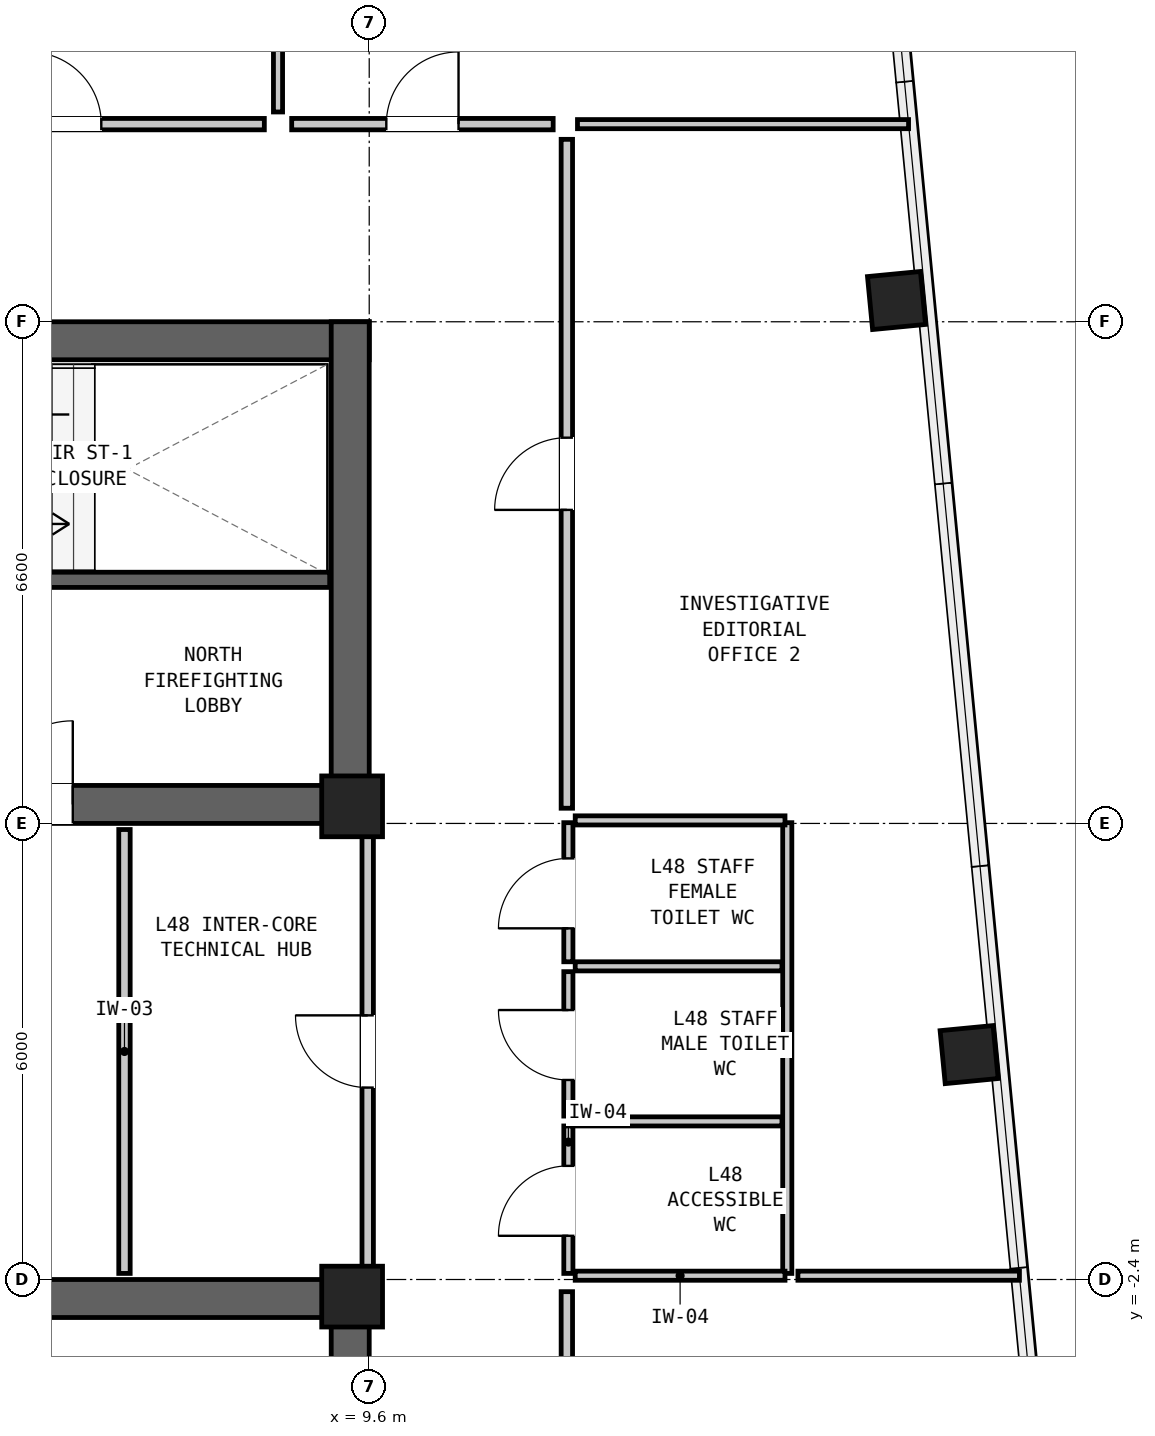
"""IFC4 building model, lengths in metres.
Left out: names, types, materials, properties, quantities, classifications, styles, units other than length and angle.
Written with IfcOpenShell. Run it as: python <this file> out.ifc"""

import sys

from ifc_helpers import new_model, si_unit, direction, frame, frame_2d, origin, origin_2d, place, context, subcontext, project, spatial, rectangle, hollow_rectangle, extrude, element, fill, save


model = new_model("IFC4")
c1 = context("Model", 3, precision=1e-05, world=origin(), true_north=direction((0.0, 1.0)))
c2 = subcontext(c1, "Body", "Model", "MODEL_VIEW")
j1 = project(units=[si_unit("LENGTHUNIT", "METRE"), si_unit("PLANEANGLEUNIT", "RADIAN")], contexts=[c1])
p1 = place(None, origin())
s1 = spatial("IfcSite", under=j1, at=p1, CompositionType="ELEMENT")
p2 = place(p1, origin())
s2 = spatial("IfcBuilding", under=s1, at=p2, CompositionType="ELEMENT")
p3 = place(p2, frame((0.0, 0.0, 165.3)))
s3 = spatial("IfcBuildingStorey", under=s2, at=p3, CompositionType="ELEMENT", Elevation=165.3)
p4 = place(p3, frame((-9.6, 9.95, 0.0), z_axis=(0.0, 0.0, 1.0), x_axis=(1.0, 0.0, 0.0)))
e1 = element("IfcWall", 1, at=p4, inside=s3, PredefinedType="SHEAR", context=c2, shape_type="SweptSolid", body=[
    extrude(rectangle(XDim=19.2, YDim=0.5, at=frame_2d((9.6, 0.0))), origin(), (0.0, 0.0, 1.0), 3.05),
])
p5 = place(p3, frame((-9.6, 3.85, 0.0), z_axis=(0.0, 0.0, 1.0), x_axis=(1.0, 0.0, 0.0)))
e2 = element("IfcWall", 2, at=p5, inside=s3, PredefinedType="SHEAR", context=c2, shape_type="SweptSolid", body=[
    extrude(rectangle(XDim=19.2, YDim=0.5, at=frame_2d((9.6, 0.0))), origin(), (0.0, 0.0, 1.0), 3.05),
])
p6 = place(p5, frame((14.2, 0.0, 0.0)))
e3 = element("IfcOpeningElement", 3, at=p6, cuts=e2, PredefinedType="OPENING", context=c2, shape_type="SweptSolid", body=[
    extrude(rectangle(XDim=1.1, YDim=2.08, at=frame_2d((0.55, 1.04))), frame((0.0, 0.262, 0.0), z_axis=(0.0, -1.0, 0.0), x_axis=(1.0, 0.0, 0.0)), (0.0, 0.0, 1.0), 0.524),
])
p7 = place(p5, frame((8.2, 0.0, 0.0)))
e4 = element("IfcOpeningElement", 4, at=p7, cuts=e2, PredefinedType="OPENING", context=c2, shape_type="SweptSolid", body=[
    extrude(rectangle(XDim=1.15, YDim=2.1, at=frame_2d((0.575, 1.05))), frame((0.0, 0.262, 0.0), z_axis=(0.0, -1.0, 0.0), x_axis=(1.0, 0.0, 0.0)), (0.0, 0.0, 1.0), 0.524),
])
p8 = place(p5, frame((2.5, 0.0, 0.0)))
e5 = element("IfcOpeningElement", 5, at=p8, cuts=e2, PredefinedType="OPENING", context=c2, shape_type="SweptSolid", body=[
    extrude(rectangle(XDim=1.2, YDim=2.1, at=frame_2d((0.6, 1.05))), frame((0.0, 0.262, 0.0), z_axis=(0.0, -1.0, 0.0), x_axis=(1.0, 0.0, 0.0)), (0.0, 0.0, 1.0), 0.524),
])
p9 = place(p3, frame((9.35, 3.6, 0.0), z_axis=(0.0, 0.0, 1.0), x_axis=(0.0, 1.0, 0.0)))
e6 = element("IfcWall", 6, at=p9, inside=s3, PredefinedType="SHEAR", context=c2, shape_type="SweptSolid", body=[
    extrude(rectangle(XDim=6.6, YDim=0.5, at=frame_2d((3.3, 0.0))), origin(), (0.0, 0.0, 1.0), 3.05),
])
p10 = place(p3, frame((-9.6, -2.65, 0.0), z_axis=(0.0, 0.0, 1.0), x_axis=(1.0, 0.0, 0.0)))
e7 = element("IfcWall", 7, at=p10, inside=s3, PredefinedType="SHEAR", context=c2, shape_type="SweptSolid", body=[
    extrude(rectangle(XDim=19.2, YDim=0.5, at=frame_2d((9.6, 0.0))), origin(), (0.0, 0.0, 1.0), 3.05),
])
p11 = place(p10, frame((3.8, 0.0, 0.0)))
e8 = element("IfcOpeningElement", 8, at=p11, cuts=e7, PredefinedType="OPENING", context=c2, shape_type="SweptSolid", body=[
    extrude(rectangle(XDim=1.1, YDim=2.08, at=frame_2d((0.55, 1.04))), frame((0.0, 0.262, 0.0), z_axis=(0.0, -1.0, 0.0), x_axis=(1.0, 0.0, 0.0)), (0.0, 0.0, 1.0), 0.524),
])
p12 = place(p10, frame((13.0, 0.0, 0.0)))
e9 = element("IfcOpeningElement", 9, at=p12, cuts=e7, PredefinedType="OPENING", context=c2, shape_type="SweptSolid", body=[
    extrude(rectangle(XDim=1.6, YDim=2.12, at=frame_2d((0.8, 1.06))), frame((0.0, 0.262, 0.0), z_axis=(0.0, -1.0, 0.0), x_axis=(1.0, 0.0, 0.0)), (0.0, 0.0, 1.0), 0.524),
])
p13 = place(p3, frame((9.35, -9.0, 0.0), z_axis=(0.0, 0.0, 1.0), x_axis=(0.0, 1.0, 0.0)))
e10 = element("IfcWall", 10, at=p13, inside=s3, PredefinedType="SHEAR", context=c2, shape_type="SweptSolid", body=[
    extrude(rectangle(XDim=6.6, YDim=0.5, at=frame_2d((3.3, 0.0))), origin(), (0.0, 0.0, 1.0), 3.05),
])
for number, where, z_axis, x_axis in (
    (11, (17.493, 0.559, 0.0), (0.0, 0.0, 1.0), (-0.096, 0.995, 0.0)),
    (12, (16.537, 10.479, 0.0), (0.0, 0.0, 1.0), (-0.096, 0.995, 0.0)),
):
    element("IfcColumn", number, at=place(p3, frame(where, z_axis=z_axis, x_axis=x_axis)), inside=s3, PredefinedType="COLUMN", context=c2, shape_type="SweptSolid", body=[
        extrude(hollow_rectangle(XDim=0.7, YDim=0.7, WallThickness=0.045, at=origin_2d()), origin(), (0.0, 0.0, 1.0), 3.05),
    ])
for number, where, z_axis, x_axis in (
    (13, (9.375, 3.825, 0.0), (0.0, 0.0, 1.0), (1.0, 0.0, 0.0)),
    (14, (9.375, -2.625, 0.0), (0.0, 0.0, 1.0), (1.0, 0.0, 0.0)),
):
    element("IfcColumn", number, at=place(p3, frame(where, z_axis=z_axis, x_axis=x_axis)), inside=s3, PredefinedType="COLUMN", context=c2, shape_type="SweptSolid", body=[
        extrude(rectangle(XDim=0.8, YDim=0.8, at=origin_2d()), origin(), (0.0, 0.0, 1.0), 3.05),
    ])
p14 = place(p3, frame((2.36, 6.805, 0.0), z_axis=(0.0, 0.0, 1.0), x_axis=(1.0, 0.0, 0.0)))
e15 = element("IfcWall", 15, at=p14, inside=s3, PredefinedType="SHEAR", context=c2, shape_type="SweptSolid", body=[
    extrude(rectangle(XDim=6.72, YDim=0.2, at=frame_2d((3.36, 0.0))), origin(), (0.0, 0.0, 1.0), 2.83),
])
p15 = place(p14, frame((0.3, 0.0, 0.0)))
e16 = element("IfcOpeningElement", 16, at=p15, cuts=e15, PredefinedType="OPENING", context=c2, shape_type="SweptSolid", body=[
    extrude(rectangle(XDim=1.05, YDim=2.08, at=frame_2d((0.525, 1.04))), frame((0.0, 0.112, 0.0), z_axis=(0.0, -1.0, 0.0), x_axis=(1.0, 0.0, 0.0)), (0.0, 0.0, 1.0), 0.224),
])
p16 = place(p3, frame((6.38, -2.32, 0.0), z_axis=(0.0, 0.0, 1.0), x_axis=(0.0, 1.0, 0.0)))
e17 = element("IfcWall", 17, at=p16, inside=s3, PredefinedType="PARTITIONING", context=c2, shape_type="SweptSolid", body=[
    extrude(rectangle(XDim=5.84, YDim=0.15, at=frame_2d((2.92, 0.0))), origin(), (0.0, 0.0, 1.0), 2.198),
])
p17 = place(p3, frame((9.58, -2.32, 0.0), z_axis=(0.0, 0.0, 1.0), x_axis=(0.0, 1.0, 0.0)))
e18 = element("IfcWall", 18, at=p17, inside=s3, PredefinedType="PARTITIONING", context=c2, shape_type="SweptSolid", body=[
    extrude(rectangle(XDim=5.84, YDim=0.15, at=frame_2d((2.92, 0.0))), origin(), (0.0, 0.0, 1.0), 2.198),
])
p18 = place(p17, frame((2.445, 0.0, 0.0)))
e19 = element("IfcOpeningElement", 19, at=p18, cuts=e18, PredefinedType="OPENING", context=c2, shape_type="SweptSolid", body=[
    extrude(rectangle(XDim=0.95, YDim=2.1, at=frame_2d((0.475, 1.05))), frame((0.0, 0.087, 0.0), z_axis=(0.0, -1.0, 0.0), x_axis=(1.0, 0.0, 0.0)), (0.0, 0.0, 1.0), 0.174),
])
p19 = place(p3, frame((12.22, -2.32, 0.0), z_axis=(0.0, 0.0, 1.0), x_axis=(0.0, 1.0, 0.0)))
e20 = element("IfcWall", 20, at=p19, inside=s3, PredefinedType="PARTITIONING", context=c2, shape_type="SweptSolid", body=[
    extrude(rectangle(XDim=1.94, YDim=0.12, at=frame_2d((0.97, 0.0))), origin(), (0.0, 0.0, 1.0), 2.83),
])
p20 = place(p19, frame((0.495, 0.0, 0.0)))
e21 = element("IfcOpeningElement", 21, at=p20, cuts=e20, PredefinedType="OPENING", context=c2, shape_type="SweptSolid", body=[
    extrude(rectangle(XDim=0.92, YDim=2.1, at=frame_2d((0.46, 1.05))), frame((0.0, 0.072, 0.0), z_axis=(0.0, -1.0, 0.0), x_axis=(1.0, 0.0, 0.0)), (0.0, 0.0, 1.0), 0.144),
])
p21 = place(p3, frame((12.22, -0.25, 0.0), z_axis=(0.0, 0.0, 1.0), x_axis=(0.0, 1.0, 0.0)))
e22 = element("IfcWall", 22, at=p21, inside=s3, PredefinedType="PARTITIONING", context=c2, shape_type="SweptSolid", body=[
    extrude(rectangle(XDim=1.9, YDim=0.12, at=frame_2d((0.95, 0.0))), origin(), (0.0, 0.0, 1.0), 2.83),
])
p22 = place(p21, frame((0.475, 0.0, 0.0)))
e23 = element("IfcOpeningElement", 23, at=p22, cuts=e22, PredefinedType="OPENING", context=c2, shape_type="SweptSolid", body=[
    extrude(rectangle(XDim=0.92, YDim=2.1, at=frame_2d((0.46, 1.05))), frame((0.0, 0.072, 0.0), z_axis=(0.0, -1.0, 0.0), x_axis=(1.0, 0.0, 0.0)), (0.0, 0.0, 1.0), 0.144),
])
p23 = place(p3, frame((12.22, 1.78, 0.0), z_axis=(0.0, 0.0, 1.0), x_axis=(0.0, 1.0, 0.0)))
e24 = element("IfcWall", 24, at=p23, inside=s3, PredefinedType="PARTITIONING", context=c2, shape_type="SweptSolid", body=[
    extrude(rectangle(XDim=1.83, YDim=0.12, at=frame_2d((0.915, 0.0))), origin(), (0.0, 0.0, 1.0), 2.83),
])
p24 = place(p23, frame((0.44, 0.0, 0.0)))
e25 = element("IfcOpeningElement", 25, at=p24, cuts=e24, PredefinedType="OPENING", context=c2, shape_type="SweptSolid", body=[
    extrude(rectangle(XDim=0.92, YDim=2.1, at=frame_2d((0.46, 1.05))), frame((0.0, 0.072, 0.0), z_axis=(0.0, -1.0, 0.0), x_axis=(1.0, 0.0, 0.0)), (0.0, 0.0, 1.0), 0.144),
])
p25 = place(p3, frame((15.1, -2.32, 0.0), z_axis=(0.0, 0.0, 1.0), x_axis=(0.0, 1.0, 0.0)))
e26 = element("IfcWall", 26, at=p25, inside=s3, PredefinedType="PARTITIONING", context=c2, shape_type="SweptSolid", body=[
    extrude(rectangle(XDim=5.93, YDim=0.12, at=frame_2d((2.965, 0.0))), origin(), (0.0, 0.0, 1.0), 2.83),
])
for number, where, z_axis, x_axis in (
    (27, (12.31, -2.35, 0.0), (0.0, 0.0, 1.0), (1.0, 0.0, 0.0)),
    (28, (12.31, 3.64, 0.0), (0.0, 0.0, 1.0), (1.0, 0.0, 0.0)),
):
    element("IfcWall", number, at=place(p3, frame(where, z_axis=z_axis, x_axis=x_axis)), inside=s3, PredefinedType="PARTITIONING", context=c2, shape_type="SweptSolid", body=[
        extrude(rectangle(XDim=2.76, YDim=0.12, at=frame_2d((1.38, 0.0))), origin(), (0.0, 0.0, 1.0), 1.883),
    ])
for number, where, z_axis, x_axis in (
    (29, (12.31, -0.32, 0.0), (0.0, 0.0, 1.0), (1.0, 0.0, 0.0)),
    (30, (12.31, 1.72, 0.0), (0.0, 0.0, 1.0), (1.0, 0.0, 0.0)),
):
    element("IfcWall", number, at=place(p3, frame(where, z_axis=z_axis, x_axis=x_axis)), inside=s3, PredefinedType="PARTITIONING", context=c2, shape_type="SweptSolid", body=[
        extrude(rectangle(XDim=2.72, YDim=0.12, at=frame_2d((1.36, 0.0))), origin(), (0.0, 0.0, 1.0), 2.83),
    ])
p26 = place(p3, frame((12.34, 12.8, 0.0), z_axis=(0.0, 0.0, 1.0), x_axis=(1.0, 0.0, 0.0)))
e31 = element("IfcWall", 31, at=p26, inside=s3, PredefinedType="PARTITIONING", context=c2, shape_type="SweptSolid", body=[
    extrude(rectangle(XDim=4.355, YDim=0.12, at=frame_2d((2.178, 0.0))), origin(), (0.0, 0.0, 1.0), 2.83),
])
p27 = place(p3, frame((8.4, 12.96, 0.0), z_axis=(0.0, 0.0, 1.0), x_axis=(0.0, 1.0, 0.0)))
e32 = element("IfcWall", 32, at=p27, inside=s3, PredefinedType="PARTITIONING", context=c2, shape_type="SweptSolid", body=[
    extrude(rectangle(XDim=12.857, YDim=0.12, at=frame_2d((6.428, 0.0))), origin(), (0.0, 0.0, 1.0), 2.83),
])
p28 = place(p3, frame((15.24, -2.35, 0.0), z_axis=(0.0, 0.0, 1.0), x_axis=(1.0, 0.0, 0.0)))
e33 = element("IfcWall", 33, at=p28, inside=s3, PredefinedType="PARTITIONING", context=c2, shape_type="SweptSolid", body=[
    extrude(rectangle(XDim=2.914, YDim=0.12, at=frame_2d((1.457, 0.0))), origin(), (0.0, 0.0, 1.0), 1.883),
])
p29 = place(p3, frame((2.98, 12.8, 0.0), z_axis=(0.0, 0.0, 1.0), x_axis=(1.0, 0.0, 0.0)))
e34 = element("IfcWall", 34, at=p29, inside=s3, PredefinedType="PARTITIONING", context=c2, shape_type="SweptSolid", body=[
    extrude(rectangle(XDim=5.24, YDim=0.15, at=frame_2d((2.62, 0.0))), origin(), (0.0, 0.0, 1.0), 2.83),
])
p30 = place(p29, frame((2.145, 0.0, 0.0)))
e35 = element("IfcOpeningElement", 35, at=p30, cuts=e34, PredefinedType="OPENING", context=c2, shape_type="SweptSolid", body=[
    extrude(rectangle(XDim=0.95, YDim=2.1, at=frame_2d((0.475, 1.05))), frame((0.0, 0.087, 0.0), z_axis=(0.0, -1.0, 0.0), x_axis=(1.0, 0.0, 0.0)), (0.0, 0.0, 1.0), 0.174),
])
p31 = place(p3, frame((8.58, 12.8, 0.0), z_axis=(0.0, 0.0, 1.0), x_axis=(1.0, 0.0, 0.0)))
e36 = element("IfcWall", 36, at=p31, inside=s3, PredefinedType="PARTITIONING", context=c2, shape_type="SweptSolid", body=[
    extrude(rectangle(XDim=3.44, YDim=0.15, at=frame_2d((1.72, 0.0))), origin(), (0.0, 0.0, 1.0), 2.83),
])
p32 = place(p31, frame((1.245, 0.0, 0.0)))
e37 = element("IfcOpeningElement", 37, at=p32, cuts=e36, PredefinedType="OPENING", context=c2, shape_type="SweptSolid", body=[
    extrude(rectangle(XDim=0.95, YDim=2.1, at=frame_2d((0.475, 1.05))), frame((0.0, 0.087, 0.0), z_axis=(0.0, -1.0, 0.0), x_axis=(1.0, 0.0, 0.0)), (0.0, 0.0, 1.0), 0.174),
])
p33 = place(p3, frame((12.2, -11.4, 0.0), z_axis=(0.0, 0.0, 1.0), x_axis=(0.0, 1.0, 0.0)))
e38 = element("IfcWall", 38, at=p33, inside=s3, PredefinedType="PARTITIONING", context=c2, shape_type="SweptSolid", body=[
    extrude(rectangle(XDim=8.84, YDim=0.15, at=frame_2d((4.42, 0.0))), origin(), (0.0, 0.0, 1.0), 2.83),
])
p34 = place(p33, frame((3.945, 0.0, 0.0)))
e39 = element("IfcOpeningElement", 39, at=p34, cuts=e38, PredefinedType="OPENING", context=c2, shape_type="SweptSolid", body=[
    extrude(rectangle(XDim=0.95, YDim=2.1, at=frame_2d((0.475, 1.05))), frame((0.0, 0.087, 0.0), z_axis=(0.0, -1.0, 0.0), x_axis=(1.0, 0.0, 0.0)), (0.0, 0.0, 1.0), 0.174),
])
p35 = place(p3, frame((12.2, 3.8, 0.0), z_axis=(0.0, 0.0, 1.0), x_axis=(0.0, 1.0, 0.0)))
e40 = element("IfcWall", 40, at=p35, inside=s3, PredefinedType="PARTITIONING", context=c2, shape_type="SweptSolid", body=[
    extrude(rectangle(XDim=8.8, YDim=0.15, at=frame_2d((4.4, 0.0))), origin(), (0.0, 0.0, 1.0), 2.83),
])
p36 = place(p35, frame((3.925, 0.0, 0.0)))
e41 = element("IfcOpeningElement", 41, at=p36, cuts=e40, PredefinedType="OPENING", context=c2, shape_type="SweptSolid", body=[
    extrude(rectangle(XDim=0.95, YDim=2.1, at=frame_2d((0.475, 1.05))), frame((0.0, 0.087, 0.0), z_axis=(0.0, -1.0, 0.0), x_axis=(1.0, 0.0, 0.0)), (0.0, 0.0, 1.0), 0.174),
])
p37 = place(p6, origin())
e42 = element("IfcDoor", 42, at=p37, inside=s3, OperationType="SINGLE_SWING_RIGHT", PredefinedType="DOOR", context=c2, shape_type="SweptSolid", body=[
    extrude(rectangle(XDim=1.1, YDim=2.08, at=frame_2d((0.55, 1.04))), frame((0.0, 0.025, 0.0), z_axis=(0.0, -1.0, 0.0), x_axis=(1.0, 0.0, 0.0)), (0.0, 0.0, 1.0), 0.05),
])
fill(e3, e42)
p38 = place(p18, origin())
e43 = element("IfcDoor", 43, at=p38, inside=s3, OperationType="SINGLE_SWING_RIGHT", PredefinedType="DOOR", context=c2, shape_type="SweptSolid", body=[
    extrude(rectangle(XDim=0.95, YDim=2.1, at=frame_2d((0.475, 1.05))), frame((0.0, 0.025, 0.0), z_axis=(0.0, -1.0, 0.0), x_axis=(1.0, 0.0, 0.0)), (0.0, 0.0, 1.0), 0.05),
])
fill(e19, e43)
p39 = place(p20, origin())
e44 = element("IfcDoor", 44, at=p39, inside=s3, OperationType="SINGLE_SWING_LEFT", PredefinedType="DOOR", context=c2, shape_type="SweptSolid", body=[
    extrude(rectangle(XDim=0.92, YDim=2.1, at=frame_2d((0.46, 1.05))), frame((0.0, 0.025, 0.0), z_axis=(0.0, -1.0, 0.0), x_axis=(1.0, 0.0, 0.0)), (0.0, 0.0, 1.0), 0.05),
])
fill(e21, e44)
p40 = place(p22, origin())
e45 = element("IfcDoor", 45, at=p40, inside=s3, OperationType="SINGLE_SWING_RIGHT", PredefinedType="DOOR", context=c2, shape_type="SweptSolid", body=[
    extrude(rectangle(XDim=0.92, YDim=2.1, at=frame_2d((0.46, 1.05))), frame((0.0, 0.025, 0.0), z_axis=(0.0, -1.0, 0.0), x_axis=(1.0, 0.0, 0.0)), (0.0, 0.0, 1.0), 0.05),
])
fill(e23, e45)
p41 = place(p24, origin())
e46 = element("IfcDoor", 46, at=p41, inside=s3, OperationType="SINGLE_SWING_LEFT", PredefinedType="DOOR", context=c2, shape_type="SweptSolid", body=[
    extrude(rectangle(XDim=0.92, YDim=2.1, at=frame_2d((0.46, 1.05))), frame((0.0, 0.025, 0.0), z_axis=(0.0, -1.0, 0.0), x_axis=(1.0, 0.0, 0.0)), (0.0, 0.0, 1.0), 0.05),
])
fill(e25, e46)
p42 = place(p30, origin())
e47 = element("IfcDoor", 47, at=p42, inside=s3, OperationType="SINGLE_SWING_LEFT", PredefinedType="DOOR", context=c2, shape_type="SweptSolid", body=[
    extrude(rectangle(XDim=0.95, YDim=2.1, at=frame_2d((0.475, 1.05))), frame((0.0, 0.025, 0.0), z_axis=(0.0, -1.0, 0.0), x_axis=(1.0, 0.0, 0.0)), (0.0, 0.0, 1.0), 0.05),
])
fill(e35, e47)
p43 = place(p32, origin())
e48 = element("IfcDoor", 48, at=p43, inside=s3, OperationType="SINGLE_SWING_RIGHT", PredefinedType="DOOR", context=c2, shape_type="SweptSolid", body=[
    extrude(rectangle(XDim=0.95, YDim=2.1, at=frame_2d((0.475, 1.05))), frame((0.0, 0.025, 0.0), z_axis=(0.0, -1.0, 0.0), x_axis=(1.0, 0.0, 0.0)), (0.0, 0.0, 1.0), 0.05),
])
fill(e37, e48)
p44 = place(p36, origin())
e49 = element("IfcDoor", 49, at=p44, inside=s3, OperationType="SINGLE_SWING_LEFT", PredefinedType="DOOR", context=c2, shape_type="SweptSolid", body=[
    extrude(rectangle(XDim=0.95, YDim=2.1, at=frame_2d((0.475, 1.05))), frame((0.0, 0.025, 0.0), z_axis=(0.0, -1.0, 0.0), x_axis=(1.0, 0.0, 0.0)), (0.0, 0.0, 1.0), 0.05),
])
fill(e41, e49)
save(model, sys.argv[1])
